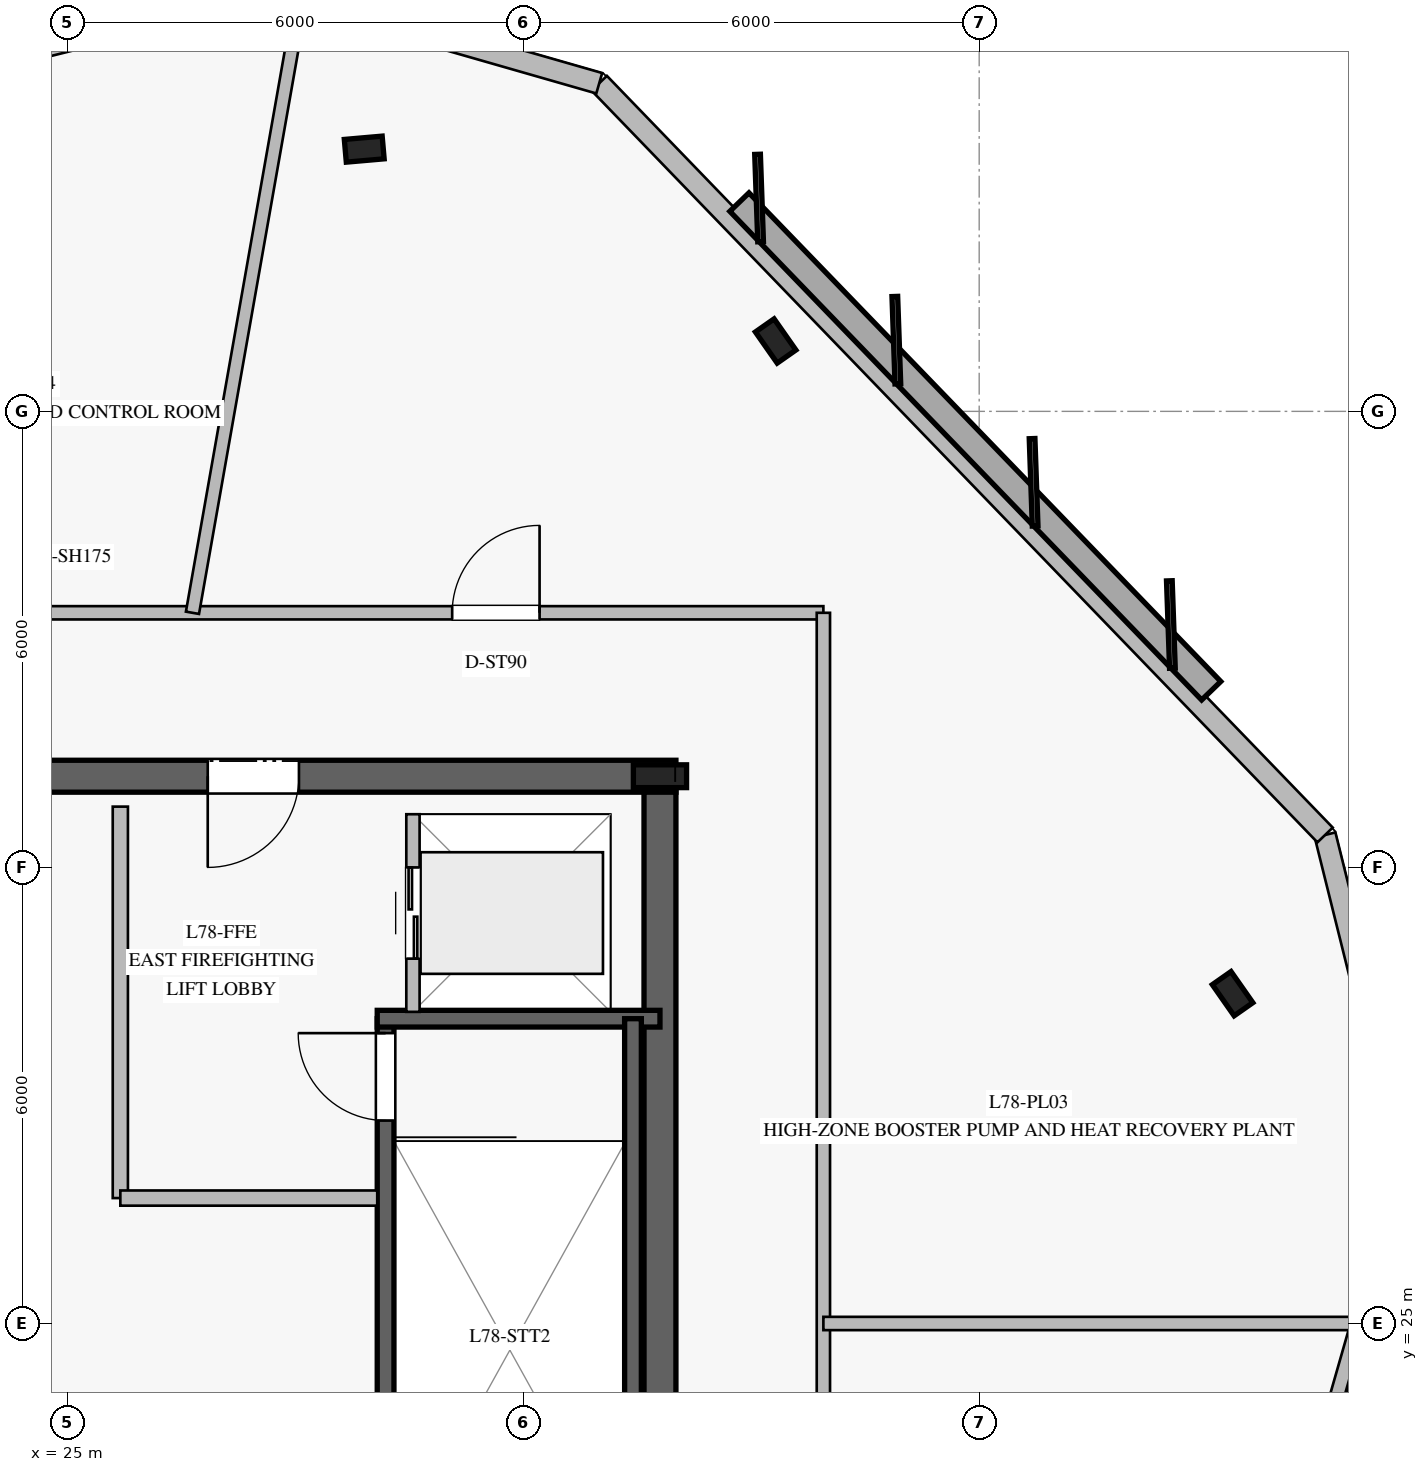
"""IFC4 building model, lengths in metres.
Left out: names, types, materials, properties, quantities, classifications, styles, units other than length and angle.
Written with IfcOpenShell. Run it as: python <this file> out.ifc"""

import sys

from ifc_helpers import new_model, si_unit, direction, frame, frame_2d, origin, origin_2d, place, context, subcontext, project, spatial, rectangle, i_section, extrude, element, fill, save


model = new_model("IFC4")
c1 = context("Model", 3, precision=1e-05, world=origin(), true_north=direction((0.0, 1.0)))
c2 = subcontext(c1, "Body", "Model", "MODEL_VIEW")
j1 = project(units=[si_unit("LENGTHUNIT", "METRE"), si_unit("PLANEANGLEUNIT", "RADIAN")], contexts=[c1])
p1 = place(None, origin())
s1 = spatial("IfcSite", under=j1, at=p1, CompositionType="ELEMENT")
p2 = place(p1, origin())
s2 = spatial("IfcBuilding", under=s1, at=p2, CompositionType="ELEMENT")
p3 = place(p2, frame((0.0, 0.0, 322.6)))
s3 = spatial("IfcBuildingStorey", under=s2, at=p3, CompositionType="ELEMENT", Elevation=322.6)
p4 = place(p3, frame((33.01, 32.2, 0.0), z_axis=(0.0, 0.0, 1.0), x_axis=(-1.0, 0.0, 0.0)))
e1 = element("IfcWall", 1, at=p4, inside=s3, PredefinedType="SHEAR", context=c2, shape_type="SweptSolid", body=[
    extrude(rectangle(XDim=16.02, YDim=0.42, at=frame_2d((8.01, 0.0))), origin(), (0.0, 0.0, 1.0), 4.1),
])
p5 = place(p4, frame((4.96, 0.0, 0.0)))
e2 = element("IfcOpeningElement", 2, at=p5, cuts=e1, PredefinedType="OPENING", context=c2, shape_type="SweptSolid", body=[
    extrude(rectangle(XDim=1.2, YDim=2.25, at=frame_2d((0.6, 1.125))), frame((0.0, 0.22, 0.0), z_axis=(0.0, -1.0, 0.0), x_axis=(1.0, 0.0, 0.0)), (0.0, 0.0, 1.0), 0.44),
])
p6 = place(p3, frame((32.8, 18.01, 0.0), z_axis=(0.0, 0.0, 1.0), x_axis=(0.0, 1.0, 0.0)))
e3 = element("IfcWall", 3, at=p6, inside=s3, PredefinedType="SHEAR", context=c2, shape_type="SweptSolid", body=[
    extrude(rectangle(XDim=13.98, YDim=0.42, at=frame_2d((6.99, 0.0))), origin(), (0.0, 0.0, 1.0), 4.1),
])
p7 = place(p3, frame((32.8, 32.2, 0.0), z_axis=(0.0, 0.0, 1.0), x_axis=(1.0, 0.0, 0.0)))
e4 = element("IfcColumn", 4, at=p7, inside=s3, PredefinedType="COLUMN", context=c2, shape_type="SweptSolid", body=[
    extrude(i_section(OverallWidth=0.3, OverallDepth=0.7, WebThickness=0.017, FlangeThickness=0.032, at=origin_2d()), origin(), (0.0, 0.0, 1.0), 4.4),
])
p8 = place(p3, frame((29.19, 21.79, 0.0), z_axis=(0.0, 0.0, 1.0), x_axis=(0.0, 1.0, 0.0)))
e5 = element("IfcWall", 5, at=p8, inside=s3, PredefinedType="SOLIDWALL", context=c2, shape_type="SweptSolid", body=[
    extrude(rectangle(XDim=7.22, YDim=0.22, at=frame_2d((3.61, 0.0))), origin(), (0.0, 0.0, 1.0), 4.1),
])
p9 = place(p8, frame((5.88, 0.0, 0.0)))
e6 = element("IfcOpeningElement", 6, at=p9, cuts=e5, PredefinedType="OPENING", context=c2, shape_type="SweptSolid", body=[
    extrude(rectangle(XDim=1.15, YDim=2.2, at=frame_2d((0.575, 1.1))), frame((0.0, 0.12, 0.0), z_axis=(0.0, -1.0, 0.0), x_axis=(1.0, 0.0, 0.0)), (0.0, 0.0, 1.0), 0.24),
])
p10 = place(p3, frame((29.08, 29.01, 0.0), z_axis=(0.0, 0.0, 1.0), x_axis=(1.0, 0.0, 0.0)))
e7 = element("IfcWall", 7, at=p10, inside=s3, PredefinedType="SOLIDWALL", context=c2, shape_type="SweptSolid", body=[
    extrude(rectangle(XDim=3.72, YDim=0.22, at=frame_2d((1.86, 0.0))), origin(), (0.0, 0.0, 1.0), 4.1),
])
p11 = place(p3, frame((32.445, 29.01, 0.0), z_axis=(0.0, 0.0, 1.0), x_axis=(0.0, -1.0, 0.0)))
e8 = element("IfcWall", 8, at=p11, inside=s3, PredefinedType="SOLIDWALL", context=c2, shape_type="SweptSolid", body=[
    extrude(rectangle(XDim=7.22, YDim=0.22, at=frame_2d((3.61, 0.0))), origin(), (0.0, 0.0, 1.0), 4.1),
])
for number, where, z_axis, x_axis in (
    (9, (28.909, 40.45, 0.0), (0.0, 0.0, 1.0), (0.996, 0.087, 0.0)),
    (10, (40.334, 29.339, 0.0), (0.0, 0.0, 1.0), (-0.574, 0.819, 0.0)),
    (11, (34.322, 37.926, 0.0), (0.0, 0.0, 1.0), (-0.574, 0.819, 0.0)),
):
    element("IfcColumn", number, at=place(p3, frame(where, z_axis=z_axis, x_axis=x_axis)), inside=s3, PredefinedType="COLUMN", context=c2, shape_type="SweptSolid", body=[
        extrude(i_section(OverallWidth=0.3, OverallDepth=0.5, WebThickness=0.014, FlangeThickness=0.028, at=origin_2d()), origin(), (0.0, 0.0, 1.0), 4.4),
    ])
p12 = place(p3, frame((27.71, 42.548, 0.0), z_axis=(0.0, 0.0, 1.0), x_axis=(-0.970292733591, -0.241933898288, 0.0)))
e12 = element("IfcWall", 12, at=p12, inside=s3, PredefinedType="STANDARD", context=c2, shape_type="SweptSolid", body=[
    extrude(rectangle(XDim=13.748, YDim=0.28, at=frame_2d((6.874, 0.0))), origin(), (0.0, 0.0, 1.0), 4.1),
])
p13 = place(p3, frame((38.842, 13.88, 0.0), z_axis=(0.0, 0.0, 1.0), x_axis=(0.275616991697, 0.961267535022, 0.0)))
e13 = element("IfcWall", 13, at=p13, inside=s3, PredefinedType="STANDARD", context=c2, shape_type="SweptSolid", body=[
    extrude(rectangle(XDim=13.748, YDim=0.28, at=frame_2d((6.874, 0.0))), origin(), (0.0, 0.0, 1.0), 4.1),
])
p14 = place(p3, frame((42.631, 27.095, 0.0), z_axis=(0.0, 0.0, 1.0), x_axis=(-0.241917978668, 0.970296702868, 0.0)))
e14 = element("IfcWall", 14, at=p14, inside=s3, PredefinedType="STANDARD", context=c2, shape_type="SweptSolid", body=[
    extrude(rectangle(XDim=4.465, YDim=0.28, at=frame_2d((2.232, 0.0))), origin(), (0.0, 0.0, 1.0), 4.1),
])
p15 = place(p3, frame((41.551, 31.427, 0.0), z_axis=(0.0, 0.0, 1.0), x_axis=(-0.69463919692, 0.719358315516, 0.0)))
e15 = element("IfcWall", 15, at=p15, inside=s3, PredefinedType="STANDARD", context=c2, shape_type="SweptSolid", body=[
    extrude(rectangle(XDim=13.748, YDim=0.28, at=frame_2d((6.874, 0.0))), origin(), (0.0, 0.0, 1.0), 4.1),
])
p16 = place(p3, frame((32.001, 41.317, 0.0), z_axis=(0.0, 0.0, 1.0), x_axis=(-0.961215848043, 0.275797196272, 0.0)))
e16 = element("IfcWall", 16, at=p16, inside=s3, PredefinedType="STANDARD", context=c2, shape_type="SweptSolid", body=[
    extrude(rectangle(XDim=4.464, YDim=0.28, at=frame_2d((2.232, 0.0))), origin(), (0.0, 0.0, 1.0), 4.1),
])
p17 = place(p3, frame((25.7, 26.65, 0.0), z_axis=(0.0, 0.0, 1.0), x_axis=(0.0, 1.0, 0.0)))
e17 = element("IfcWall", 17, at=p17, inside=s3, PredefinedType="PARTITIONING", context=c2, shape_type="SweptSolid", body=[
    extrude(rectangle(XDim=5.15, YDim=0.2, at=frame_2d((2.575, 0.0))), origin(), (0.0, 0.0, 1.0), 3.37),
])
p18 = place(p3, frame((25.7, 26.65, 0.0), z_axis=(0.0, 0.0, 1.0), x_axis=(1.0, 0.0, 0.0)))
e18 = element("IfcWall", 18, at=p18, inside=s3, PredefinedType="PARTITIONING", context=c2, shape_type="SweptSolid", body=[
    extrude(rectangle(XDim=3.38, YDim=0.2, at=frame_2d((1.69, 0.0))), origin(), (0.0, 0.0, 1.0), 2.82),
])
p19 = place(p3, frame((29.55, 29.1, 0.0), z_axis=(0.0, 0.0, 1.0), x_axis=(0.0, 1.0, 0.0)))
e19 = element("IfcWall", 19, at=p19, inside=s3, PredefinedType="PARTITIONING", context=c2, shape_type="SweptSolid", body=[
    extrude(rectangle(XDim=2.6, YDim=0.175, at=frame_2d((1.3, 0.0))), origin(), (0.0, 0.0, 1.0), 4.17),
])
p20 = place(p19, frame((0.7, 0.0, 0.0)))
e20 = element("IfcOpeningElement", 20, at=p20, cuts=e19, PredefinedType="OPENING", context=c2, shape_type="SweptSolid", body=[
    extrude(rectangle(XDim=1.2, YDim=2.2, at=frame_2d((0.6, 1.1))), frame((0.0, 0.098, 0.0), z_axis=(0.0, -1.0, 0.0), x_axis=(1.0, 0.0, 0.0)), (0.0, 0.0, 1.0), 0.195),
])
p21 = place(p3, frame((15.05, 34.35, 0.0), z_axis=(0.0, 0.0, 1.0), x_axis=(1.0, 0.0, 0.0)))
e21 = element("IfcWall", 21, at=p21, inside=s3, PredefinedType="PARTITIONING", context=c2, shape_type="SweptSolid", body=[
    extrude(rectangle(XDim=19.9, YDim=0.175, at=frame_2d((9.95, 0.0))), origin(), (0.0, 0.0, 1.0), 3.6),
])
p22 = place(p21, frame((15.016, 0.0, 0.0)))
e22 = element("IfcOpeningElement", 22, at=p22, cuts=e21, PredefinedType="OPENING", context=c2, shape_type="SweptSolid", body=[
    extrude(rectangle(XDim=1.15, YDim=2.2, at=frame_2d((0.575, 1.1))), frame((0.0, 0.098, 0.0), z_axis=(0.0, -1.0, 0.0), x_axis=(1.0, 0.0, 0.0)), (0.0, 0.0, 1.0), 0.195),
])
p23 = place(p21, frame((5.31, 0.0, 0.0)))
e23 = element("IfcOpeningElement", 23, at=p23, cuts=e21, PredefinedType="OPENING", context=c2, shape_type="SweptSolid", body=[
    extrude(rectangle(XDim=1.15, YDim=2.2, at=frame_2d((0.575, 1.1))), frame((0.0, 0.098, 0.0), z_axis=(0.0, -1.0, 0.0), x_axis=(1.0, 0.0, 0.0)), (0.0, 0.0, 1.0), 0.195),
])
p24 = place(p3, frame((34.95, 34.35, 0.0), z_axis=(0.0, 0.0, 1.0), x_axis=(0.0, -1.0, 0.0)))
e24 = element("IfcWall", 24, at=p24, inside=s3, PredefinedType="PARTITIONING", context=c2, shape_type="SweptSolid", body=[
    extrude(rectangle(XDim=18.7, YDim=0.175, at=frame_2d((9.35, 0.0))), origin(), (0.0, 0.0, 1.0), 3.6),
])
p25 = place(p24, frame((14.168, 0.0, 0.0)))
e25 = element("IfcOpeningElement", 25, at=p25, cuts=e24, PredefinedType="OPENING", context=c2, shape_type="SweptSolid", body=[
    extrude(rectangle(XDim=1.15, YDim=2.2, at=frame_2d((0.575, 1.1))), frame((0.0, 0.098, 0.0), z_axis=(0.0, -1.0, 0.0), x_axis=(1.0, 0.0, 0.0)), (0.0, 0.0, 1.0), 0.195),
])
p26 = place(p3, frame((26.649, 34.35, 0.0), z_axis=(0.0, 0.0, 1.0), x_axis=(0.173619687581, 0.984812776158, 0.0)))
e26 = element("IfcWall", 26, at=p26, inside=s3, PredefinedType="PARTITIONING", context=c2, shape_type="SweptSolid", body=[
    extrude(rectangle(XDim=8.156, YDim=0.175, at=frame_2d((4.078, 0.0))), origin(), (0.0, 0.0, 1.0), 3.6),
])
p27 = place(p3, frame((34.95, 25.0, 0.0), z_axis=(0.0, 0.0, 1.0), x_axis=(1.0, 0.0, 0.0)))
e27 = element("IfcWall", 27, at=p27, inside=s3, PredefinedType="PARTITIONING", context=c2, shape_type="SweptSolid", body=[
    extrude(rectangle(XDim=7.006, YDim=0.175, at=frame_2d((3.503, 0.0))), origin(), (0.0, 0.0, 1.0), 3.6),
])
p28 = place(p9, origin())
e28 = element("IfcDoor", 28, at=p28, inside=s3, OperationType="SINGLE_SWING_RIGHT", PredefinedType="DOOR", context=c2, shape_type="SweptSolid", body=[
    extrude(rectangle(XDim=1.15, YDim=2.2, at=frame_2d((0.575, 1.1))), frame((0.0, 0.025, 0.0), z_axis=(0.0, -1.0, 0.0), x_axis=(1.0, 0.0, 0.0)), (0.0, 0.0, 1.0), 0.05),
])
fill(e6, e28)
p29 = place(p5, origin())
e29 = element("IfcDoor", 29, at=p29, inside=s3, OperationType="SINGLE_SWING_RIGHT", PredefinedType="DOOR", context=c2, shape_type="SweptSolid", body=[
    extrude(rectangle(XDim=1.2, YDim=2.25, at=frame_2d((0.6, 1.125))), frame((0.0, 0.025, 0.0), z_axis=(0.0, -1.0, 0.0), x_axis=(1.0, 0.0, 0.0)), (0.0, 0.0, 1.0), 0.05),
])
fill(e2, e29)
p30 = place(p20, origin())
e30 = element("IfcDoor", 30, at=p30, inside=s3, OperationType="DOUBLE_DOOR_SLIDING", PredefinedType="DOOR", context=c2, shape_type="SweptSolid", body=[
    extrude(rectangle(XDim=1.2, YDim=2.2, at=frame_2d((0.6, 1.1))), frame((0.0, 0.025, 0.0), z_axis=(0.0, -1.0, 0.0), x_axis=(1.0, 0.0, 0.0)), (0.0, 0.0, 1.0), 0.05),
])
fill(e20, e30)
p31 = place(p22, origin())
e31 = element("IfcDoor", 31, at=p31, inside=s3, OperationType="SINGLE_SWING_RIGHT", PredefinedType="DOOR", context=c2, shape_type="SweptSolid", body=[
    extrude(rectangle(XDim=1.15, YDim=2.2, at=frame_2d((0.575, 1.1))), frame((0.0, 0.025, 0.0), z_axis=(0.0, -1.0, 0.0), x_axis=(1.0, 0.0, 0.0)), (0.0, 0.0, 1.0), 0.05),
])
fill(e22, e31)
save(model, sys.argv[1])
